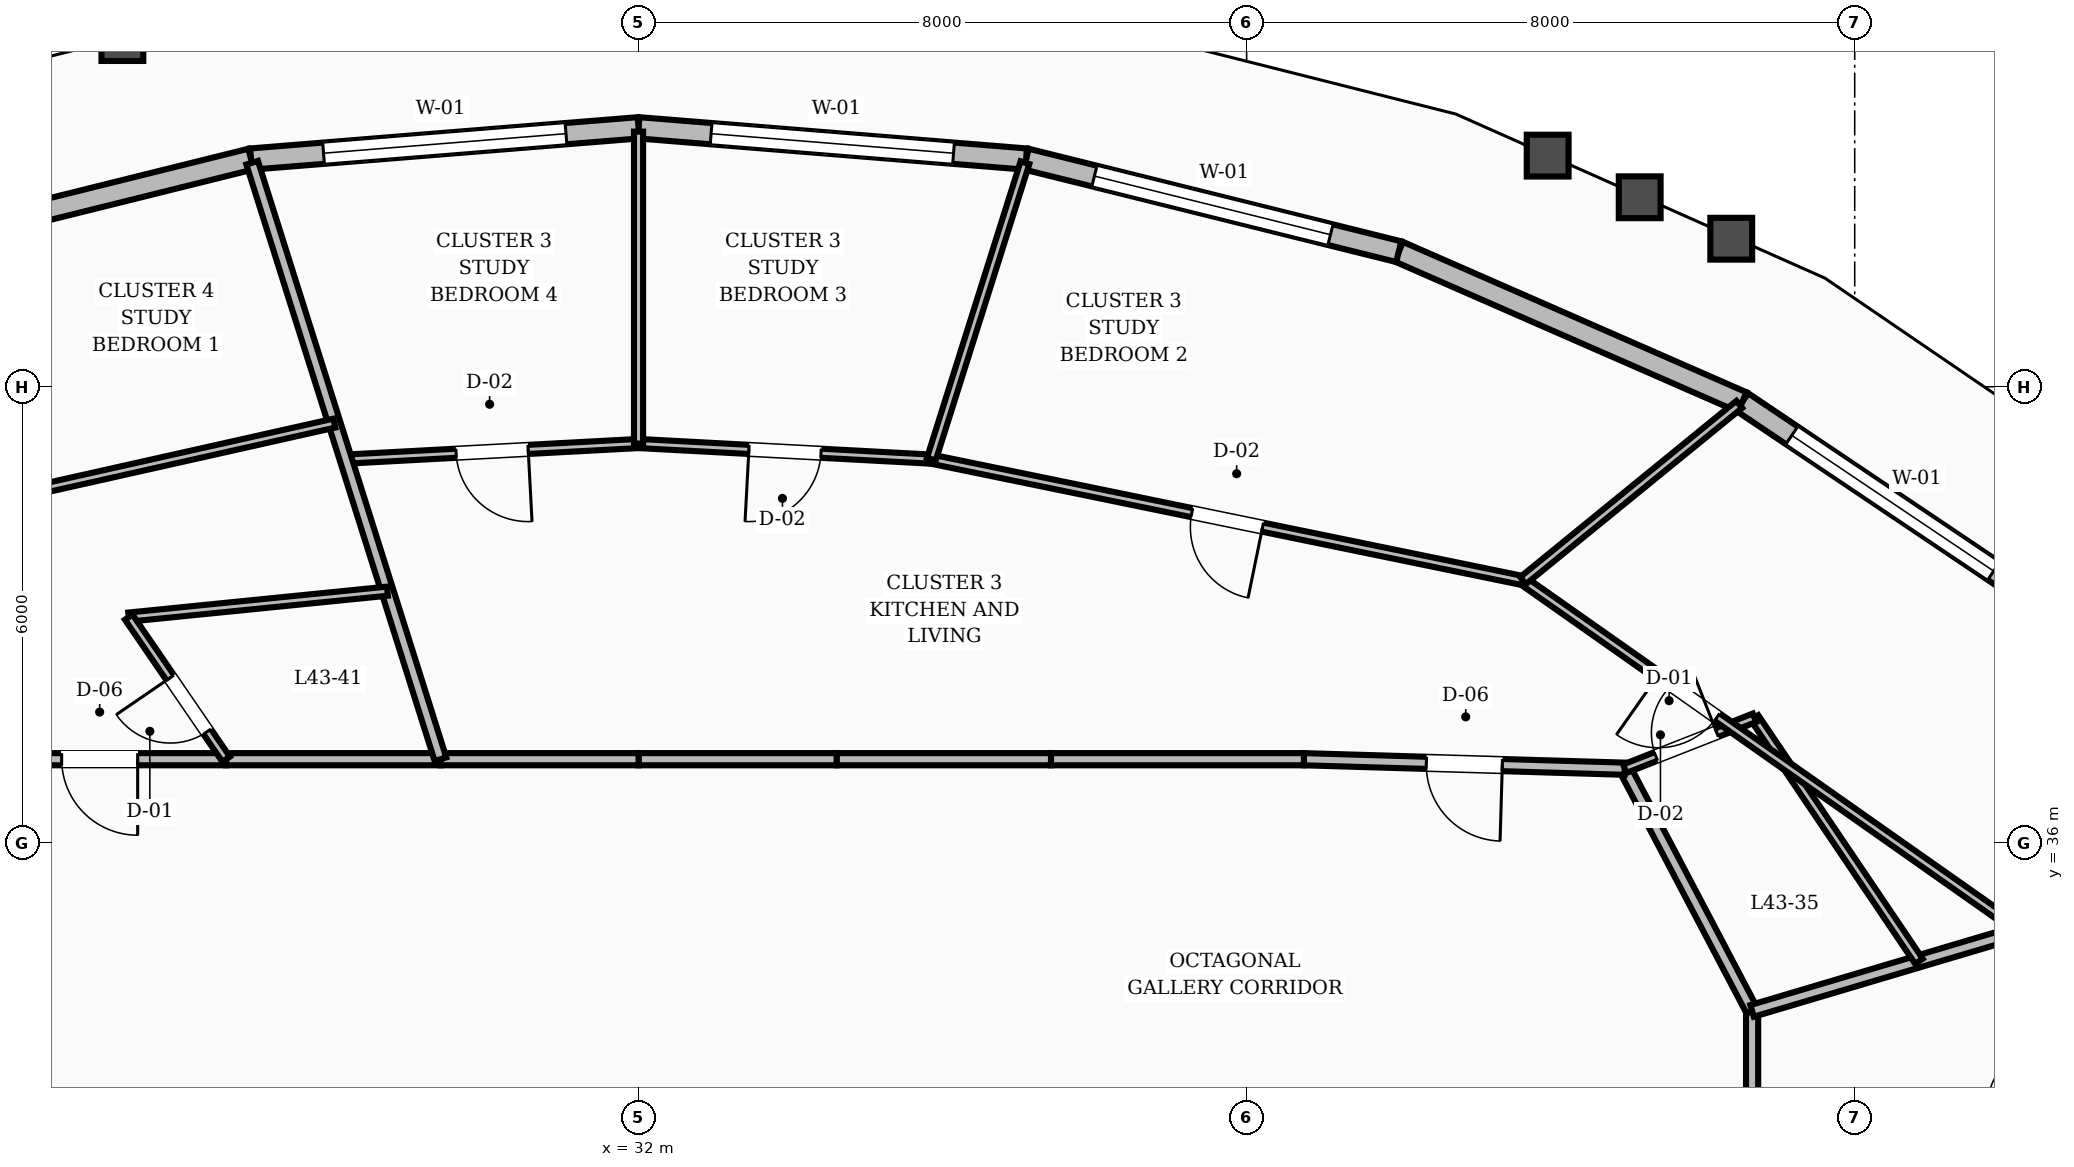
"""IFC4 building model, lengths in metres.
Left out: names, types, materials, properties, quantities, classifications, styles, units other than length and angle.
Written with IfcOpenShell. Run it as: python <this file> out.ifc"""

import sys

from ifc_helpers import new_model, si_unit, direction, frame, frame_2d, origin, place, context, subcontext, project, spatial, rectangle, extrude, element, fill, save


model = new_model("IFC4")
c1 = context("Model", 3, precision=1e-05, world=origin(), true_north=direction((0.0, 1.0)))
c2 = subcontext(c1, "Body", "Model", "MODEL_VIEW")
j1 = project(units=[si_unit("LENGTHUNIT", "METRE"), si_unit("PLANEANGLEUNIT", "RADIAN")], contexts=[c1])
p1 = place(None, origin())
s1 = spatial("IfcSite", under=j1, at=p1, CompositionType="ELEMENT")
p2 = place(p1, origin())
s2 = spatial("IfcBuilding", under=s1, at=p2, CompositionType="ELEMENT")
p3 = place(p2, frame((0.0, 0.0, 167.6)))
s3 = spatial("IfcBuildingStorey", under=s2, at=p3, CompositionType="ELEMENT", Elevation=167.6)
p4 = place(p3, frame((50.48, 39.137, 0.0), z_axis=(0.0, 0.0, 1.0), x_axis=(-0.829911180813, 0.557895538575, 0.0)))
e1 = element("IfcWall", 1, at=p4, inside=s3, PredefinedType="STANDARD", context=c2, shape_type="SweptSolid", body=[
    extrude(rectangle(XDim=4.772, YDim=0.28, at=frame_2d((2.386, 0.0))), origin(), (0.0, 0.0, 1.0), 2.82),
])
p5 = place(p4, frame((0.786, 0.0, 0.8)))
e2 = element("IfcOpeningElement", 2, at=p5, cuts=e1, PredefinedType="OPENING", context=c2, shape_type="SweptSolid", body=[
    extrude(rectangle(XDim=3.2, YDim=1.65, at=frame_2d((1.6, 0.825))), frame((0.0, 0.15, 0.0), z_axis=(0.0, -1.0, 0.0), x_axis=(1.0, 0.0, 0.0)), (0.0, 0.0, 1.0), 0.3),
])
p6 = place(p3, frame((46.52, 41.799, 0.0), z_axis=(0.0, 0.0, 1.0), x_axis=(-0.916070979736, 0.401016159381, 0.0)))
e3 = element("IfcWall", 3, at=p6, inside=s3, PredefinedType="STANDARD", context=c2, shape_type="SweptSolid", body=[
    extrude(rectangle(XDim=4.933, YDim=0.28, at=frame_2d((2.466, 0.0))), origin(), (0.0, 0.0, 1.0), 2.82),
])
p7 = place(p3, frame((42.001, 43.777, 0.0), z_axis=(0.0, 0.0, 1.0), x_axis=(-0.970488320416, 0.241148128617, 0.0)))
e4 = element("IfcWall", 4, at=p7, inside=s3, PredefinedType="STANDARD", context=c2, shape_type="SweptSolid", body=[
    extrude(rectangle(XDim=5.052, YDim=0.28, at=frame_2d((2.526, 0.0))), origin(), (0.0, 0.0, 1.0), 2.82),
])
p8 = place(p7, frame((0.926, 0.0, 0.8)))
e5 = element("IfcOpeningElement", 5, at=p8, cuts=e4, PredefinedType="OPENING", context=c2, shape_type="SweptSolid", body=[
    extrude(rectangle(XDim=3.2, YDim=1.65, at=frame_2d((1.6, 0.825))), frame((0.0, 0.15, 0.0), z_axis=(0.0, -1.0, 0.0), x_axis=(1.0, 0.0, 0.0)), (0.0, 0.0, 1.0), 0.3),
])
p9 = place(p3, frame((37.099, 44.995, 0.0), z_axis=(0.0, 0.0, 1.0), x_axis=(-0.996760870248, 0.080422431831, 0.0)))
e6 = element("IfcWall", 6, at=p9, inside=s3, PredefinedType="STANDARD", context=c2, shape_type="SweptSolid", body=[
    extrude(rectangle(XDim=5.115, YDim=0.28, at=frame_2d((2.558, 0.0))), origin(), (0.0, 0.0, 1.0), 2.82),
])
p10 = place(p9, frame((0.958, 0.0, 0.8)))
e7 = element("IfcOpeningElement", 7, at=p10, cuts=e6, PredefinedType="OPENING", context=c2, shape_type="SweptSolid", body=[
    extrude(rectangle(XDim=3.2, YDim=1.65, at=frame_2d((1.6, 0.825))), frame((0.0, 0.15, 0.0), z_axis=(0.0, -1.0, 0.0), x_axis=(1.0, 0.0, 0.0)), (0.0, 0.0, 1.0), 0.3),
])
p11 = place(p3, frame((32.0, 45.407, 0.0), z_axis=(0.0, 0.0, 1.0), x_axis=(-0.996760870248, -0.080422431831, 0.0)))
e8 = element("IfcWall", 8, at=p11, inside=s3, PredefinedType="STANDARD", context=c2, shape_type="SweptSolid", body=[
    extrude(rectangle(XDim=5.115, YDim=0.28, at=frame_2d((2.558, 0.0))), origin(), (0.0, 0.0, 1.0), 2.82),
])
p12 = place(p11, frame((0.958, 0.0, 0.8)))
e9 = element("IfcOpeningElement", 9, at=p12, cuts=e8, PredefinedType="OPENING", context=c2, shape_type="SweptSolid", body=[
    extrude(rectangle(XDim=3.2, YDim=1.65, at=frame_2d((1.6, 0.825))), frame((0.0, 0.15, 0.0), z_axis=(0.0, -1.0, 0.0), x_axis=(1.0, 0.0, 0.0)), (0.0, 0.0, 1.0), 0.3),
])
p13 = place(p3, frame((26.901, 44.995, 0.0), z_axis=(0.0, 0.0, 1.0), x_axis=(-0.970488320416, -0.241148128617, 0.0)))
e10 = element("IfcWall", 10, at=p13, inside=s3, PredefinedType="STANDARD", context=c2, shape_type="SweptSolid", body=[
    extrude(rectangle(XDim=5.052, YDim=0.28, at=frame_2d((2.526, 0.0))), origin(), (0.0, 0.0, 1.0), 2.82),
])
p14 = place(p3, frame((46.65, 30.068, 0.0), z_axis=(0.0, 0.0, 1.0), x_axis=(0.0, 1.0, 0.0)))
e11 = element("IfcWall", 11, at=p14, inside=s3, PredefinedType="SOLIDWALL", context=c2, shape_type="SweptSolid", body=[
    extrude(rectangle(XDim=3.721, YDim=0.16, at=frame_2d((1.86, 0.0))), origin(), (0.0, 0.0, 1.0), 2.8),
])
p15 = place(p3, frame((46.65, 33.789, 0.0), z_axis=(0.0, 0.0, 1.0), x_axis=(-0.46527115782, 0.885168204185, 0.0)))
e12 = element("IfcWall", 12, at=p15, inside=s3, PredefinedType="SOLIDWALL", context=c2, shape_type="SweptSolid", body=[
    extrude(rectangle(XDim=3.6, YDim=0.16, at=frame_2d((1.8, 0.0))), origin(), (0.0, 0.0, 1.0), 2.8),
])
p16 = place(p3, frame((44.975, 36.975, 0.0), z_axis=(0.0, 0.0, 1.0), x_axis=(-0.999561990195, 0.029594387265, 0.0)))
e13 = element("IfcWall", 13, at=p16, inside=s3, PredefinedType="SOLIDWALL", context=c2, shape_type="SweptSolid", body=[
    extrude(rectangle(XDim=4.224, YDim=0.16, at=frame_2d((2.112, 0.0))), origin(), (0.0, 0.0, 1.0), 2.8),
])
p17 = place(p16, frame((1.612, 0.0, 0.0)))
e14 = element("IfcOpeningElement", 14, at=p17, cuts=e13, PredefinedType="OPENING", context=c2, shape_type="SweptSolid", body=[
    extrude(rectangle(XDim=1.0, YDim=2.1, at=frame_2d((0.5, 1.05))), frame((0.0, 0.09, 0.0), z_axis=(0.0, -1.0, 0.0), x_axis=(1.0, 0.0, 0.0)), (0.0, 0.0, 1.0), 0.18),
])
p18 = place(p3, frame((40.753, 37.1, 0.0), z_axis=(0.0, 0.0, 1.0), x_axis=(-1.0, 0.0, 0.0)))
e15 = element("IfcWall", 15, at=p18, inside=s3, PredefinedType="SOLIDWALL", context=c2, shape_type="SweptSolid", body=[
    extrude(rectangle(XDim=3.327, YDim=0.16, at=frame_2d((1.664, 0.0))), origin(), (0.0, 0.0, 1.0), 2.8),
])
p19 = place(p3, frame((37.426, 37.1, 0.0), z_axis=(0.0, 0.0, 1.0), x_axis=(-1.0, 0.0, 0.0)))
e16 = element("IfcWall", 16, at=p19, inside=s3, PredefinedType="SOLIDWALL", context=c2, shape_type="SweptSolid", body=[
    extrude(rectangle(XDim=2.821, YDim=0.16, at=frame_2d((1.41, 0.0))), origin(), (0.0, 0.0, 1.0), 2.8),
])
for number, where, z_axis, x_axis in (
    (17, (34.606, 37.1, 0.0), (0.0, 0.0, 1.0), (-1.0, 0.0, 0.0)),
    (18, (32.0, 37.1, 0.0), (0.0, 0.0, 1.0), (-1.0, 0.0, 0.0)),
):
    element("IfcWall", number, at=place(p3, frame(where, z_axis=z_axis, x_axis=x_axis)), inside=s3, PredefinedType="SOLIDWALL", context=c2, shape_type="SweptSolid", body=[
        extrude(rectangle(XDim=2.606, YDim=0.16, at=frame_2d((1.303, 0.0))), origin(), (0.0, 0.0, 1.0), 2.8),
    ])
p20 = place(p3, frame((29.394, 37.1, 0.0), z_axis=(0.0, 0.0, 1.0), x_axis=(-1.0, 0.0, 0.0)))
e19 = element("IfcWall", 19, at=p20, inside=s3, PredefinedType="SOLIDWALL", context=c2, shape_type="SweptSolid", body=[
    extrude(rectangle(XDim=2.821, YDim=0.16, at=frame_2d((1.41, 0.0))), origin(), (0.0, 0.0, 1.0), 2.8),
])
p21 = place(p3, frame((26.574, 37.1, 0.0), z_axis=(0.0, 0.0, 1.0), x_axis=(-1.0, 0.0, 0.0)))
e20 = element("IfcWall", 20, at=p21, inside=s3, PredefinedType="SOLIDWALL", context=c2, shape_type="SweptSolid", body=[
    extrude(rectangle(XDim=3.327, YDim=0.16, at=frame_2d((1.664, 0.0))), origin(), (0.0, 0.0, 1.0), 2.8),
])
p22 = place(p21, frame((1.164, 0.0, 0.0)))
e21 = element("IfcOpeningElement", 21, at=p22, cuts=e20, PredefinedType="OPENING", context=c2, shape_type="SweptSolid", body=[
    extrude(rectangle(XDim=1.0, YDim=2.1, at=frame_2d((0.5, 1.05))), frame((0.0, 0.09, 0.0), z_axis=(0.0, -1.0, 0.0), x_axis=(1.0, 0.0, 0.0)), (0.0, 0.0, 1.0), 0.18),
])
p23 = place(p3, frame((46.65, 33.789, 0.0), z_axis=(0.0, 0.0, 1.0), x_axis=(0.95857221619, 0.284849620586, 0.0)))
e22 = element("IfcWall", 22, at=p23, inside=s3, PredefinedType="SOLIDWALL", context=c2, shape_type="SweptSolid", body=[
    extrude(rectangle(XDim=7.337, YDim=0.16, at=frame_2d((3.668, 0.0))), origin(), (0.0, 0.0, 1.0), 2.8),
])
p24 = place(p3, frame((48.845, 34.441, 0.0), z_axis=(0.0, 0.0, 1.0), x_axis=(-0.559572632914, 0.828781315242, 0.0)))
e23 = element("IfcWall", 23, at=p24, inside=s3, PredefinedType="PARTITIONING", context=c2, shape_type="SweptSolid", body=[
    extrude(rectangle(XDim=3.866, YDim=0.12, at=frame_2d((1.933, 0.0))), origin(), (0.0, 0.0, 1.0), 2.8),
])
p25 = place(p3, frame((44.975, 36.975, 0.0), z_axis=(0.0, 0.0, 1.0), x_axis=(0.930800041421, 0.365528771631, 0.0)))
e24 = element("IfcWall", 24, at=p25, inside=s3, PredefinedType="PARTITIONING", context=c2, shape_type="SweptSolid", body=[
    extrude(rectangle(XDim=1.833, YDim=0.12, at=frame_2d((0.917, 0.0))), origin(), (0.0, 0.0, 1.0), 2.8),
])
p26 = place(p25, frame((0.44, 0.0, 0.0)))
e25 = element("IfcOpeningElement", 25, at=p26, cuts=e24, PredefinedType="OPENING", context=c2, shape_type="SweptSolid", body=[
    extrude(rectangle(XDim=0.86, YDim=2.1, at=frame_2d((0.43, 1.05))), frame((0.0, 0.07, 0.0), z_axis=(0.0, -1.0, 0.0), x_axis=(1.0, 0.0, 0.0)), (0.0, 0.0, 1.0), 0.14),
])
p27 = place(p3, frame((50.19, 34.841, 0.0), z_axis=(0.0, 0.0, 1.0), x_axis=(-0.81799600151, 0.575223905547, 0.0)))
e26 = element("IfcWall", 26, at=p27, inside=s3, PredefinedType="PARTITIONING", context=c2, shape_type="SweptSolid", body=[
    extrude(rectangle(XDim=8.012, YDim=0.12, at=frame_2d((4.006, 0.0))), origin(), (0.0, 0.0, 1.0), 2.8),
])
p28 = place(p27, frame((4.891, 0.0, 0.0)))
e27 = element("IfcOpeningElement", 27, at=p28, cuts=e26, PredefinedType="OPENING", context=c2, shape_type="SweptSolid", body=[
    extrude(rectangle(XDim=0.95, YDim=2.1, at=frame_2d((0.475, 1.05))), frame((0.0, 0.07, 0.0), z_axis=(0.0, -1.0, 0.0), x_axis=(1.0, 0.0, 0.0)), (0.0, 0.0, 1.0), 0.14),
])
p29 = place(p3, frame((43.636, 39.449, 0.0), z_axis=(0.0, 0.0, 1.0), x_axis=(-0.979568261135, 0.201111963285, 0.0)))
e28 = element("IfcWall", 28, at=p29, inside=s3, PredefinedType="PARTITIONING", context=c2, shape_type="SweptSolid", body=[
    extrude(rectangle(XDim=7.947, YDim=0.12, at=frame_2d((3.973, 0.0))), origin(), (0.0, 0.0, 1.0), 2.8),
])
p30 = place(p29, frame((3.498, 0.0, 0.0)))
e29 = element("IfcOpeningElement", 29, at=p30, cuts=e28, PredefinedType="OPENING", context=c2, shape_type="SweptSolid", body=[
    extrude(rectangle(XDim=0.95, YDim=2.1, at=frame_2d((0.475, 1.05))), frame((0.0, 0.07, 0.0), z_axis=(0.0, -1.0, 0.0), x_axis=(1.0, 0.0, 0.0)), (0.0, 0.0, 1.0), 0.14),
])
p31 = place(p3, frame((43.636, 39.449, 0.0), z_axis=(0.0, 0.0, 1.0), x_axis=(0.775242225658, 0.631664065431, 0.0)))
e30 = element("IfcWall", 30, at=p31, inside=s3, PredefinedType="PARTITIONING", context=c2, shape_type="SweptSolid", body=[
    extrude(rectangle(XDim=3.669, YDim=0.12, at=frame_2d((1.835, 0.0))), origin(), (0.0, 0.0, 1.0), 2.8),
])
p32 = place(p3, frame((35.852, 41.048, 0.0), z_axis=(0.0, 0.0, 1.0), x_axis=(-0.998575909079, 0.053349356192, 0.0)))
e31 = element("IfcWall", 31, at=p32, inside=s3, PredefinedType="PARTITIONING", context=c2, shape_type="SweptSolid", body=[
    extrude(rectangle(XDim=3.858, YDim=0.12, at=frame_2d((1.929, 0.0))), origin(), (0.0, 0.0, 1.0), 2.8),
])
p33 = place(p32, frame((1.454, 0.0, 0.0)))
e32 = element("IfcOpeningElement", 32, at=p33, cuts=e31, PredefinedType="OPENING", context=c2, shape_type="SweptSolid", body=[
    extrude(rectangle(XDim=0.95, YDim=2.1, at=frame_2d((0.475, 1.05))), frame((0.0, 0.07, 0.0), z_axis=(0.0, -1.0, 0.0), x_axis=(1.0, 0.0, 0.0)), (0.0, 0.0, 1.0), 0.14),
])
p34 = place(p3, frame((35.852, 41.048, 0.0), z_axis=(0.0, 0.0, 1.0), x_axis=(0.301037088962, 0.953612432317, 0.0)))
e33 = element("IfcWall", 33, at=p34, inside=s3, PredefinedType="PARTITIONING", context=c2, shape_type="SweptSolid", body=[
    extrude(rectangle(XDim=4.09, YDim=0.12, at=frame_2d((2.045, 0.0))), origin(), (0.0, 0.0, 1.0), 2.8),
])
p35 = place(p3, frame((32.0, 41.253, 0.0), z_axis=(0.0, 0.0, 1.0), x_axis=(-0.998575909079, -0.053349356192, 0.0)))
e34 = element("IfcWall", 34, at=p35, inside=s3, PredefinedType="PARTITIONING", context=c2, shape_type="SweptSolid", body=[
    extrude(rectangle(XDim=3.858, YDim=0.12, at=frame_2d((1.929, 0.0))), origin(), (0.0, 0.0, 1.0), 2.8),
])
p36 = place(p35, frame((1.454, 0.0, 0.0)))
e35 = element("IfcOpeningElement", 35, at=p36, cuts=e34, PredefinedType="OPENING", context=c2, shape_type="SweptSolid", body=[
    extrude(rectangle(XDim=0.95, YDim=2.1, at=frame_2d((0.475, 1.05))), frame((0.0, 0.07, 0.0), z_axis=(0.0, -1.0, 0.0), x_axis=(1.0, 0.0, 0.0)), (0.0, 0.0, 1.0), 0.14),
])
p37 = place(p3, frame((32.0, 41.253, 0.0), z_axis=(0.0, 0.0, 1.0), x_axis=(0.0, 1.0, 0.0)))
e36 = element("IfcWall", 36, at=p37, inside=s3, PredefinedType="PARTITIONING", context=c2, shape_type="SweptSolid", body=[
    extrude(rectangle(XDim=4.103, YDim=0.12, at=frame_2d((2.052, 0.0))), origin(), (0.0, 0.0, 1.0), 2.8),
])
p38 = place(p3, frame((29.394, 37.1, 0.0), z_axis=(0.0, 0.0, 1.0), x_axis=(-0.301084514056, 0.953597459831, 0.0)))
e37 = element("IfcWall", 37, at=p38, inside=s3, PredefinedType="SOLIDWALL", context=c2, shape_type="SweptSolid", body=[
    extrude(rectangle(XDim=8.229, YDim=0.16, at=frame_2d((4.115, 0.0))), origin(), (0.0, 0.0, 1.0), 2.8),
])
p39 = place(p3, frame((28.696, 39.311, 0.0), z_axis=(0.0, 0.0, 1.0), x_axis=(-0.995009592211, -0.099779313529, 0.0)))
e38 = element("IfcWall", 38, at=p39, inside=s3, PredefinedType="PARTITIONING", context=c2, shape_type="SweptSolid", body=[
    extrude(rectangle(XDim=3.421, YDim=0.12, at=frame_2d((1.71, 0.0))), origin(), (0.0, 0.0, 1.0), 2.8),
])
p40 = place(p3, frame((26.574, 37.1, 0.0), z_axis=(0.0, 0.0, 1.0), x_axis=(-0.565270811555, 0.824905394335, 0.0)))
e39 = element("IfcWall", 39, at=p40, inside=s3, PredefinedType="PARTITIONING", context=c2, shape_type="SweptSolid", body=[
    extrude(rectangle(XDim=2.266, YDim=0.12, at=frame_2d((1.133, 0.0))), origin(), (0.0, 0.0, 1.0), 2.8),
])
p41 = place(p40, frame((0.44, 0.0, 0.0)))
e40 = element("IfcOpeningElement", 40, at=p41, cuts=e39, PredefinedType="OPENING", context=c2, shape_type="SweptSolid", body=[
    extrude(rectangle(XDim=0.86, YDim=2.1, at=frame_2d((0.43, 1.05))), frame((0.0, 0.07, 0.0), z_axis=(0.0, -1.0, 0.0), x_axis=(1.0, 0.0, 0.0)), (0.0, 0.0, 1.0), 0.14),
])
p42 = place(p3, frame((27.998, 41.521, 0.0), z_axis=(0.0, 0.0, 1.0), x_axis=(-0.975756725435, -0.218857973964, 0.0)))
e41 = element("IfcWall", 41, at=p42, inside=s3, PredefinedType="PARTITIONING", context=c2, shape_type="SweptSolid", body=[
    extrude(rectangle(XDim=8.179, YDim=0.12, at=frame_2d((4.089, 0.0))), origin(), (0.0, 0.0, 1.0), 2.8),
])
p43 = place(p42, frame((5.011, 0.0, 0.0)))
e42 = element("IfcOpeningElement", 42, at=p43, cuts=e41, PredefinedType="OPENING", context=c2, shape_type="SweptSolid", body=[
    extrude(rectangle(XDim=0.95, YDim=2.1, at=frame_2d((0.475, 1.05))), frame((0.0, 0.07, 0.0), z_axis=(0.0, -1.0, 0.0), x_axis=(1.0, 0.0, 0.0)), (0.0, 0.0, 1.0), 0.14),
])
p44 = place(p5, origin())
e43 = element("IfcWindow", 43, at=p44, inside=s3, PartitioningType="SINGLE_PANEL", PredefinedType="WINDOW", context=c2, shape_type="SweptSolid", body=[
    extrude(rectangle(XDim=3.2, YDim=1.65, at=frame_2d((1.6, 0.825))), frame((0.0, 0.03, 0.0), z_axis=(0.0, -1.0, 0.0), x_axis=(1.0, 0.0, 0.0)), (0.0, 0.0, 1.0), 0.06),
])
fill(e2, e43)
p45 = place(p8, origin())
e44 = element("IfcWindow", 44, at=p45, inside=s3, PartitioningType="SINGLE_PANEL", PredefinedType="WINDOW", context=c2, shape_type="SweptSolid", body=[
    extrude(rectangle(XDim=3.2, YDim=1.65, at=frame_2d((1.6, 0.825))), frame((0.0, 0.03, 0.0), z_axis=(0.0, -1.0, 0.0), x_axis=(1.0, 0.0, 0.0)), (0.0, 0.0, 1.0), 0.06),
])
fill(e5, e44)
p46 = place(p10, origin())
e45 = element("IfcWindow", 45, at=p46, inside=s3, PartitioningType="SINGLE_PANEL", PredefinedType="WINDOW", context=c2, shape_type="SweptSolid", body=[
    extrude(rectangle(XDim=3.2, YDim=1.65, at=frame_2d((1.6, 0.825))), frame((0.0, 0.03, 0.0), z_axis=(0.0, -1.0, 0.0), x_axis=(1.0, 0.0, 0.0)), (0.0, 0.0, 1.0), 0.06),
])
fill(e7, e45)
p47 = place(p12, origin())
e46 = element("IfcWindow", 46, at=p47, inside=s3, PartitioningType="SINGLE_PANEL", PredefinedType="WINDOW", context=c2, shape_type="SweptSolid", body=[
    extrude(rectangle(XDim=3.2, YDim=1.65, at=frame_2d((1.6, 0.825))), frame((0.0, 0.03, 0.0), z_axis=(0.0, -1.0, 0.0), x_axis=(1.0, 0.0, 0.0)), (0.0, 0.0, 1.0), 0.06),
])
fill(e9, e46)
p48 = place(p26, origin())
e47 = element("IfcDoor", 47, at=p48, inside=s3, OperationType="SINGLE_SWING_RIGHT", PredefinedType="DOOR", context=c2, shape_type="SweptSolid", body=[
    extrude(rectangle(XDim=0.86, YDim=2.1, at=frame_2d((0.43, 1.05))), frame((0.0, 0.025, 0.0), z_axis=(0.0, -1.0, 0.0), x_axis=(1.0, 0.0, 0.0)), (0.0, 0.0, 1.0), 0.05),
])
fill(e25, e47)
p49 = place(p17, origin())
e48 = element("IfcDoor", 48, at=p49, inside=s3, OperationType="SINGLE_SWING_LEFT", PredefinedType="DOOR", context=c2, shape_type="SweptSolid", body=[
    extrude(rectangle(XDim=1.0, YDim=2.1, at=frame_2d((0.5, 1.05))), frame((0.0, 0.025, 0.0), z_axis=(0.0, -1.0, 0.0), x_axis=(1.0, 0.0, 0.0)), (0.0, 0.0, 1.0), 0.05),
])
fill(e14, e48)
p50 = place(p28, origin())
e49 = element("IfcDoor", 49, at=p50, inside=s3, OperationType="SINGLE_SWING_RIGHT", PredefinedType="DOOR", context=c2, shape_type="SweptSolid", body=[
    extrude(rectangle(XDim=0.95, YDim=2.1, at=frame_2d((0.475, 1.05))), frame((0.0, 0.025, 0.0), z_axis=(0.0, -1.0, 0.0), x_axis=(1.0, 0.0, 0.0)), (0.0, 0.0, 1.0), 0.05),
])
fill(e27, e49)
p51 = place(p30, origin())
e50 = element("IfcDoor", 50, at=p51, inside=s3, OperationType="SINGLE_SWING_LEFT", PredefinedType="DOOR", context=c2, shape_type="SweptSolid", body=[
    extrude(rectangle(XDim=0.95, YDim=2.1, at=frame_2d((0.475, 1.05))), frame((0.0, 0.025, 0.0), z_axis=(0.0, -1.0, 0.0), x_axis=(1.0, 0.0, 0.0)), (0.0, 0.0, 1.0), 0.05),
])
fill(e29, e50)
p52 = place(p33, origin())
e51 = element("IfcDoor", 51, at=p52, inside=s3, OperationType="SINGLE_SWING_RIGHT", PredefinedType="DOOR", context=c2, shape_type="SweptSolid", body=[
    extrude(rectangle(XDim=0.95, YDim=2.1, at=frame_2d((0.475, 1.05))), frame((0.0, 0.025, 0.0), z_axis=(0.0, -1.0, 0.0), x_axis=(1.0, 0.0, 0.0)), (0.0, 0.0, 1.0), 0.05),
])
fill(e32, e51)
p53 = place(p36, origin())
e52 = element("IfcDoor", 52, at=p53, inside=s3, OperationType="SINGLE_SWING_LEFT", PredefinedType="DOOR", context=c2, shape_type="SweptSolid", body=[
    extrude(rectangle(XDim=0.95, YDim=2.1, at=frame_2d((0.475, 1.05))), frame((0.0, 0.025, 0.0), z_axis=(0.0, -1.0, 0.0), x_axis=(1.0, 0.0, 0.0)), (0.0, 0.0, 1.0), 0.05),
])
fill(e35, e52)
p54 = place(p41, origin())
e53 = element("IfcDoor", 53, at=p54, inside=s3, OperationType="SINGLE_SWING_RIGHT", PredefinedType="DOOR", context=c2, shape_type="SweptSolid", body=[
    extrude(rectangle(XDim=0.86, YDim=2.1, at=frame_2d((0.43, 1.05))), frame((0.0, 0.025, 0.0), z_axis=(0.0, -1.0, 0.0), x_axis=(1.0, 0.0, 0.0)), (0.0, 0.0, 1.0), 0.05),
])
fill(e40, e53)
p55 = place(p22, origin())
e54 = element("IfcDoor", 54, at=p55, inside=s3, OperationType="SINGLE_SWING_LEFT", PredefinedType="DOOR", context=c2, shape_type="SweptSolid", body=[
    extrude(rectangle(XDim=1.0, YDim=2.1, at=frame_2d((0.5, 1.05))), frame((0.0, 0.025, 0.0), z_axis=(0.0, -1.0, 0.0), x_axis=(1.0, 0.0, 0.0)), (0.0, 0.0, 1.0), 0.05),
])
fill(e21, e54)
save(model, sys.argv[1])
